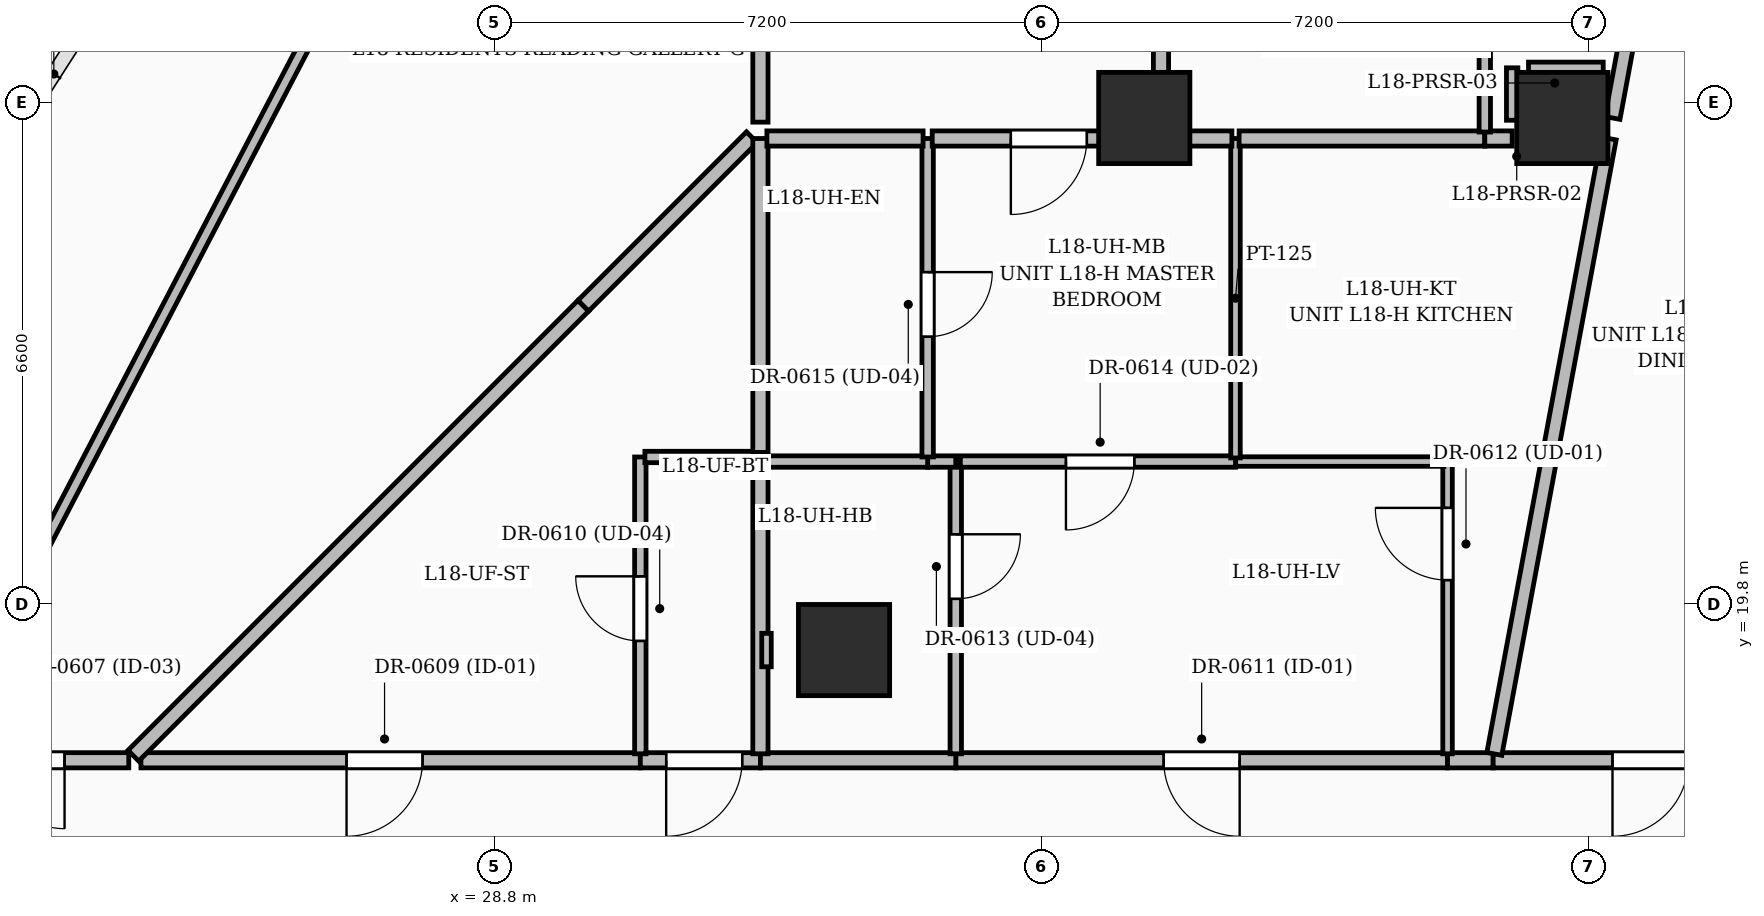
"""IFC4 building model, lengths in metres.
Left out: names, types, materials, properties, quantities, classifications, styles, units other than length and angle.
Written with IfcOpenShell. Run it as: python <this file> out.ifc"""

import sys

from ifc_helpers import new_model, si_unit, direction, frame, frame_2d, origin, origin_2d, place, context, subcontext, project, spatial, rectangle, extrude, element, fill, save


model = new_model("IFC4")
c1 = context("Model", 3, precision=1e-05, world=origin(), true_north=direction((0.0, 1.0)))
c2 = subcontext(c1, "Body", "Model", "MODEL_VIEW")
j1 = project(units=[si_unit("LENGTHUNIT", "METRE"), si_unit("PLANEANGLEUNIT", "RADIAN")], contexts=[c1])
p1 = place(None, origin())
s1 = spatial("IfcSite", under=j1, at=p1, CompositionType="ELEMENT")
p2 = place(p1, origin())
s2 = spatial("IfcBuilding", under=s1, at=p2, CompositionType="ELEMENT")
p3 = place(p2, frame((0.0, 0.0, 75.0)))
s3 = spatial("IfcBuildingStorey", under=s2, at=p3, CompositionType="ELEMENT", Elevation=75.0)
for number, where, z_axis, x_axis in (
    (1, (42.85, 26.2, 0.0), (0.0, 0.0, 1.0), (1.0, 0.0, 0.0)),
    (2, (37.35, 26.2, 0.0), (0.0, 0.0, 1.0), (1.0, 0.0, 0.0)),
    (3, (33.4, 19.2, 0.0), (0.0, 0.0, 1.0), (1.0, 0.0, 0.0)),
):
    element("IfcColumn", number, at=place(p3, frame(where, z_axis=z_axis, x_axis=x_axis)), inside=s3, PredefinedType="COLUMN", context=c2, shape_type="SweptSolid", body=[
        extrude(rectangle(XDim=1.2, YDim=1.2, at=origin_2d()), origin(), (0.0, 0.0, 1.0), 3.6),
    ])
p4 = place(p3, frame((30.72, 17.75, 0.0), z_axis=(0.0, 0.0, 1.0), x_axis=(-1.0, 0.0, 0.0)))
e4 = element("IfcWall", 4, at=p4, inside=s3, PredefinedType="PARTITIONING", context=c2, shape_type="SweptSolid", body=[
    extrude(rectangle(XDim=6.57, YDim=0.2, at=frame_2d((3.285, 0.0))), origin(), (0.0, 0.0, 1.0), 2.345),
])
p5 = place(p4, frame((2.865, 0.0, 0.0)))
e5 = element("IfcOpeningElement", 5, at=p5, cuts=e4, PredefinedType="OPENING", context=c2, shape_type="SweptSolid", body=[
    extrude(rectangle(XDim=1.0, YDim=2.2, at=frame_2d((0.5, 1.1))), frame((0.0, 0.11, 0.0), z_axis=(0.0, -1.0, 0.0), x_axis=(1.0, 0.0, 0.0)), (0.0, 0.0, 1.0), 0.22),
])
p6 = place(p3, frame((32.3, 17.75, 0.0), z_axis=(0.0, 0.0, 1.0), x_axis=(-1.0, 0.0, 0.0)))
e6 = element("IfcWall", 6, at=p6, inside=s3, PredefinedType="PARTITIONING", context=c2, shape_type="SweptSolid", body=[
    extrude(rectangle(XDim=1.58, YDim=0.2, at=frame_2d((0.79, 0.0))), origin(), (0.0, 0.0, 1.0), 3.35),
])
p7 = place(p6, frame((0.24, 0.0, 0.0)))
e7 = element("IfcOpeningElement", 7, at=p7, cuts=e6, PredefinedType="OPENING", context=c2, shape_type="SweptSolid", body=[
    extrude(rectangle(XDim=1.0, YDim=2.2, at=frame_2d((0.5, 1.1))), frame((0.0, 0.11, 0.0), z_axis=(0.0, -1.0, 0.0), x_axis=(1.0, 0.0, 0.0)), (0.0, 0.0, 1.0), 0.22),
])
p8 = place(p3, frame((23.99, 17.75, 0.0), z_axis=(0.0, 0.0, 1.0), x_axis=(-1.0, 0.0, 0.0)))
e8 = element("IfcWall", 8, at=p8, inside=s3, PredefinedType="PARTITIONING", context=c2, shape_type="SweptSolid", body=[
    extrude(rectangle(XDim=2.505, YDim=0.2, at=frame_2d((1.252, 0.0))), origin(), (0.0, 0.0, 1.0), 2.345),
])
p9 = place(p8, frame((0.845, 0.0, 0.0)))
e9 = element("IfcOpeningElement", 9, at=p9, cuts=e8, PredefinedType="OPENING", context=c2, shape_type="SweptSolid", body=[
    extrude(rectangle(XDim=0.9, YDim=2.1, at=frame_2d((0.45, 1.05))), frame((0.0, 0.11, 0.0), z_axis=(0.0, -1.0, 0.0), x_axis=(1.0, 0.0, 0.0)), (0.0, 0.0, 1.0), 0.22),
])
p10 = place(p3, frame((41.34, 17.75, 0.0), z_axis=(0.0, 0.0, 1.0), x_axis=(-1.0, 0.0, 0.0)))
e10 = element("IfcWall", 10, at=p10, inside=s3, PredefinedType="PARTITIONING", context=c2, shape_type="SweptSolid", body=[
    extrude(rectangle(XDim=6.47, YDim=0.2, at=frame_2d((3.235, 0.0))), origin(), (0.0, 0.0, 1.0), 3.35),
])
p11 = place(p10, frame((2.735, 0.0, 0.0)))
e11 = element("IfcOpeningElement", 11, at=p11, cuts=e10, PredefinedType="OPENING", context=c2, shape_type="SweptSolid", body=[
    extrude(rectangle(XDim=1.0, YDim=2.2, at=frame_2d((0.5, 1.1))), frame((0.0, 0.11, 0.0), z_axis=(0.0, -1.0, 0.0), x_axis=(1.0, 0.0, 0.0)), (0.0, 0.0, 1.0), 0.22),
])
p12 = place(p3, frame((34.87, 17.75, 0.0), z_axis=(0.0, 0.0, 1.0), x_axis=(-1.0, 0.0, 0.0)))
e12 = element("IfcWall", 12, at=p12, inside=s3, PredefinedType="PARTITIONING", context=c2, shape_type="SweptSolid", body=[
    extrude(rectangle(XDim=2.57, YDim=0.2, at=frame_2d((1.285, 0.0))), origin(), (0.0, 0.0, 1.0), 2.309),
])
p13 = place(p3, frame((41.94, 17.75, 0.0), z_axis=(0.0, 0.0, 1.0), x_axis=(-1.0, 0.0, 0.0)))
e13 = element("IfcWall", 13, at=p13, inside=s3, PredefinedType="PARTITIONING", context=c2, shape_type="SweptSolid", body=[
    extrude(rectangle(XDim=0.6, YDim=0.2, at=frame_2d((0.3, 0.0))), origin(), (0.0, 0.0, 1.0), 3.35),
])
p14 = place(p3, frame((47.51, 17.75, 0.0), z_axis=(0.0, 0.0, 1.0), x_axis=(-1.0, 0.0, 0.0)))
e14 = element("IfcWall", 14, at=p14, inside=s3, PredefinedType="PARTITIONING", context=c2, shape_type="SweptSolid", body=[
    extrude(rectangle(XDim=5.57, YDim=0.2, at=frame_2d((2.785, 0.0))), origin(), (0.0, 0.0, 1.0), 2.309),
])
p15 = place(p14, frame((3.0, 0.0, 0.0)))
e15 = element("IfcOpeningElement", 15, at=p15, cuts=e14, PredefinedType="OPENING", context=c2, shape_type="SweptSolid", body=[
    extrude(rectangle(XDim=1.0, YDim=2.2, at=frame_2d((0.5, 1.1))), frame((0.0, 0.11, 0.0), z_axis=(0.0, -1.0, 0.0), x_axis=(1.0, 0.0, 0.0)), (0.0, 0.0, 1.0), 0.22),
])
p16 = place(p3, frame((21.4, 17.75, 0.0), z_axis=(0.0, 0.0, 1.0), x_axis=(0.46207959711, 0.886838455376, 0.0)))
e16 = element("IfcWall", 16, at=p16, inside=s3, PredefinedType="PARTITIONING", context=c2, shape_type="SweptSolid", body=[
    extrude(rectangle(XDim=23.589, YDim=0.15, at=frame_2d((11.795, 0.0))), origin(), (0.0, 0.0, 1.0), 2.345),
])
p17 = place(p3, frame((30.72, 17.835, 0.0), z_axis=(0.0, 0.0, 1.0), x_axis=(0.0, 1.0, 0.0)))
e17 = element("IfcWall", 17, at=p17, inside=s3, PredefinedType="PARTITIONING", context=c2, shape_type="SweptSolid", body=[
    extrude(rectangle(XDim=3.905, YDim=0.15, at=frame_2d((1.953, 0.0))), origin(), (0.0, 0.0, 1.0), 2.345),
])
p18 = place(p17, frame((1.485, 0.0, 0.0)))
e18 = element("IfcOpeningElement", 18, at=p18, cuts=e17, PredefinedType="OPENING", context=c2, shape_type="SweptSolid", body=[
    extrude(rectangle(XDim=0.85, YDim=2.1, at=frame_2d((0.425, 1.05))), frame((0.0, 0.085, 0.0), z_axis=(0.0, -1.0, 0.0), x_axis=(1.0, 0.0, 0.0)), (0.0, 0.0, 1.0), 0.17),
])
p19 = place(p3, frame((29.97, 23.73, 0.0), z_axis=(0.0, 0.0, 1.0), x_axis=(-0.707106781187, -0.707106781187, 0.0)))
e19 = element("IfcWall", 19, at=p19, inside=s3, PredefinedType="PARTITIONING", context=c2, shape_type="SweptSolid", body=[
    extrude(rectangle(XDim=8.372, YDim=0.2, at=frame_2d((4.186, 0.0))), origin(), (0.0, 0.0, 1.0), 2.345),
])
p20 = place(p3, frame((30.78, 21.74, 0.0), z_axis=(0.0, 0.0, 1.0), x_axis=(1.0, 0.0, 0.0)))
e20 = element("IfcWall", 20, at=p20, inside=s3, PredefinedType="PARTITIONING", context=c2, shape_type="SweptSolid", body=[
    extrude(rectangle(XDim=1.52, YDim=0.15, at=frame_2d((0.76, 0.0))), origin(), (0.0, 0.0, 1.0), 2.345),
])
p21 = place(p3, frame((32.187, 25.947, 0.0), z_axis=(0.0, 0.0, 1.0), x_axis=(-0.707106781187, -0.707106781187, 0.0)))
e21 = element("IfcWall", 21, at=p21, inside=s3, PredefinedType="PARTITIONING", context=c2, shape_type="SweptSolid", body=[
    extrude(rectangle(XDim=3.135, YDim=0.2, at=frame_2d((1.568, 0.0))), origin(), (0.0, 0.0, 1.0), 3.35),
])
p22 = place(p3, frame((32.3, 21.8, 0.0), z_axis=(0.0, 0.0, 1.0), x_axis=(0.0, 1.0, 0.0)))
e22 = element("IfcWall", 22, at=p22, inside=s3, PredefinedType="PARTITIONING", context=c2, shape_type="SweptSolid", body=[
    extrude(rectangle(XDim=4.13, YDim=0.2, at=frame_2d((2.065, 0.0))), origin(), (0.0, 0.0, 1.0), 2.911),
])
p23 = place(p3, frame((32.3, 17.835, 0.0), z_axis=(0.0, 0.0, 1.0), x_axis=(0.0, 1.0, 0.0)))
e23 = element("IfcWall", 23, at=p23, inside=s3, PredefinedType="PARTITIONING", context=c2, shape_type="SweptSolid", body=[
    extrude(rectangle(XDim=3.845, YDim=0.2, at=frame_2d((1.922, 0.0))), origin(), (0.0, 0.0, 1.0), 2.345),
])
p24 = place(p3, frame((32.3, 26.145, 0.0), z_axis=(0.0, 0.0, 1.0), x_axis=(0.0, 1.0, 0.0)))
e24 = element("IfcWall", 24, at=p24, inside=s3, PredefinedType="PARTITIONING", context=c2, shape_type="SweptSolid", body=[
    extrude(rectangle(XDim=10.775, YDim=0.2, at=frame_2d((5.387, 0.0))), origin(), (0.0, 0.0, 1.0), 2.345),
])
p25 = place(p3, frame((34.87, 21.68, 0.0), z_axis=(0.0, 0.0, 1.0), x_axis=(0.0, -1.0, 0.0)))
e25 = element("IfcWall", 25, at=p25, inside=s3, PredefinedType="PARTITIONING", context=c2, shape_type="SweptSolid", body=[
    extrude(rectangle(XDim=3.845, YDim=0.15, at=frame_2d((1.922, 0.0))), origin(), (0.0, 0.0, 1.0), 2.309),
])
p26 = place(p25, frame((0.957, 0.0, 0.0)))
e26 = element("IfcOpeningElement", 26, at=p26, cuts=e25, PredefinedType="OPENING", context=c2, shape_type="SweptSolid", body=[
    extrude(rectangle(XDim=0.85, YDim=2.1, at=frame_2d((0.425, 1.05))), frame((0.0, 0.085, 0.0), z_axis=(0.0, -1.0, 0.0), x_axis=(1.0, 0.0, 0.0)), (0.0, 0.0, 1.0), 0.17),
])
p27 = place(p3, frame((41.34, 17.835, 0.0), z_axis=(0.0, 0.0, 1.0), x_axis=(0.0, 1.0, 0.0)))
e27 = element("IfcWall", 27, at=p27, inside=s3, PredefinedType="PARTITIONING", context=c2, shape_type="SweptSolid", body=[
    extrude(rectangle(XDim=3.845, YDim=0.125, at=frame_2d((1.922, 0.0))), origin(), (0.0, 0.0, 1.0), 3.35),
])
p28 = place(p27, frame((2.285, 0.0, 0.0)))
e28 = element("IfcOpeningElement", 28, at=p28, cuts=e27, PredefinedType="OPENING", context=c2, shape_type="SweptSolid", body=[
    extrude(rectangle(XDim=0.95, YDim=2.2, at=frame_2d((0.475, 1.1))), frame((0.0, 0.072, 0.0), z_axis=(0.0, -1.0, 0.0), x_axis=(1.0, 0.0, 0.0)), (0.0, 0.0, 1.0), 0.145),
])
p29 = place(p3, frame((41.292, 21.68, 0.0), z_axis=(0.0, 0.0, 1.0), x_axis=(-1.0, 0.0, 0.0)))
e29 = element("IfcWall", 29, at=p29, inside=s3, PredefinedType="PARTITIONING", context=c2, shape_type="SweptSolid", body=[
    extrude(rectangle(XDim=2.742, YDim=0.125, at=frame_2d((1.371, 0.0))), origin(), (0.0, 0.0, 1.0), 3.35),
])
p30 = place(p3, frame((38.55, 21.68, 0.0), z_axis=(0.0, 0.0, 1.0), x_axis=(-1.0, 0.0, 0.0)))
e30 = element("IfcWall", 30, at=p30, inside=s3, PredefinedType="PARTITIONING", context=c2, shape_type="SweptSolid", body=[
    extrude(rectangle(XDim=3.62, YDim=0.15, at=frame_2d((1.81, 0.0))), origin(), (0.0, 0.0, 1.0), 2.309),
])
p31 = place(p30, frame((1.331, 0.0, 0.0)))
e31 = element("IfcOpeningElement", 31, at=p31, cuts=e30, PredefinedType="OPENING", context=c2, shape_type="SweptSolid", body=[
    extrude(rectangle(XDim=0.9, YDim=2.15, at=frame_2d((0.45, 1.075))), frame((0.0, 0.085, 0.0), z_axis=(0.0, -1.0, 0.0), x_axis=(1.0, 0.0, 0.0)), (0.0, 0.0, 1.0), 0.17),
])
p32 = place(p3, frame((34.87, 21.68, 0.0), z_axis=(0.0, 0.0, 1.0), x_axis=(-1.0, 0.0, 0.0)))
e32 = element("IfcWall", 32, at=p32, inside=s3, PredefinedType="PARTITIONING", context=c2, shape_type="SweptSolid", body=[
    extrude(rectangle(XDim=0.37, YDim=0.15, at=frame_2d((0.185, 0.0))), origin(), (0.0, 0.0, 1.0), 2.309),
])
p33 = place(p3, frame((34.5, 21.68, 0.0), z_axis=(0.0, 0.0, 1.0), x_axis=(-1.0, 0.0, 0.0)))
e33 = element("IfcWall", 33, at=p33, inside=s3, PredefinedType="PARTITIONING", context=c2, shape_type="SweptSolid", body=[
    extrude(rectangle(XDim=2.115, YDim=0.15, at=frame_2d((1.058, 0.0))), origin(), (0.0, 0.0, 1.0), 3.35),
])
p34 = place(p3, frame((38.55, 25.93, 0.0), z_axis=(0.0, 0.0, 1.0), x_axis=(0.0, -1.0, 0.0)))
e34 = element("IfcWall", 34, at=p34, inside=s3, PredefinedType="PARTITIONING", context=c2, shape_type="SweptSolid", body=[
    extrude(rectangle(XDim=4.202, YDim=0.125, at=frame_2d((2.101, 0.0))), origin(), (0.0, 0.0, 1.0), 3.35),
])
p35 = place(p3, frame((41.956, 17.833, 0.0), z_axis=(0.0, 0.0, 1.0), x_axis=(0.182682671213, 0.98317192883, 0.0)))
e35 = element("IfcWall", 35, at=p35, inside=s3, PredefinedType="PARTITIONING", context=c2, shape_type="SweptSolid", body=[
    extrude(rectangle(XDim=8.235, YDim=0.2, at=frame_2d((4.118, 0.0))), origin(), (0.0, 0.0, 1.0), 2.309),
])
p36 = place(p3, frame((41.83, 25.93, 0.0), z_axis=(0.0, 0.0, 1.0), x_axis=(-1.0, 0.0, 0.0)))
e36 = element("IfcWall", 36, at=p36, inside=s3, PredefinedType="PARTITIONING", context=c2, shape_type="SweptSolid", body=[
    extrude(rectangle(XDim=3.233, YDim=0.2, at=frame_2d((1.616, 0.0))), origin(), (0.0, 0.0, 1.0), 2.309),
])
p37 = place(p3, frame((42.19, 25.93, 0.0), z_axis=(0.0, 0.0, 1.0), x_axis=(-1.0, 0.0, 0.0)))
e37 = element("IfcWall", 37, at=p37, inside=s3, PredefinedType="PARTITIONING", context=c2, shape_type="SweptSolid", body=[
    extrude(rectangle(XDim=0.36, YDim=0.2, at=frame_2d((0.18, 0.0))), origin(), (0.0, 0.0, 1.0), 2.309),
])
p38 = place(p3, frame((34.5, 25.93, 0.0), z_axis=(0.0, 0.0, 1.0), x_axis=(0.0, -1.0, 0.0)))
e38 = element("IfcWall", 38, at=p38, inside=s3, PredefinedType="PARTITIONING", context=c2, shape_type="SweptSolid", body=[
    extrude(rectangle(XDim=4.19, YDim=0.15, at=frame_2d((2.095, 0.0))), origin(), (0.0, 0.0, 1.0), 3.35),
])
p39 = place(p38, frame((1.758, 0.0, 0.0)))
e39 = element("IfcOpeningElement", 39, at=p39, cuts=e38, PredefinedType="OPENING", context=c2, shape_type="SweptSolid", body=[
    extrude(rectangle(XDim=0.85, YDim=2.1, at=frame_2d((0.425, 1.05))), frame((0.0, 0.085, 0.0), z_axis=(0.0, -1.0, 0.0), x_axis=(1.0, 0.0, 0.0)), (0.0, 0.0, 1.0), 0.17),
])
p40 = place(p3, frame((37.57, 25.93, 0.0), z_axis=(0.0, 0.0, 1.0), x_axis=(-1.0, 0.0, 0.0)))
e40 = element("IfcWall", 40, at=p40, inside=s3, PredefinedType="PARTITIONING", context=c2, shape_type="SweptSolid", body=[
    extrude(rectangle(XDim=3.01, YDim=0.2, at=frame_2d((1.505, 0.0))), origin(), (0.0, 0.0, 1.0), 3.35),
])
p41 = place(p40, frame((0.975, 0.0, 0.0)))
e41 = element("IfcOpeningElement", 41, at=p41, cuts=e40, PredefinedType="OPENING", context=c2, shape_type="SweptSolid", body=[
    extrude(rectangle(XDim=1.0, YDim=2.2, at=frame_2d((0.5, 1.1))), frame((0.0, 0.11, 0.0), z_axis=(0.0, -1.0, 0.0), x_axis=(1.0, 0.0, 0.0)), (0.0, 0.0, 1.0), 0.22),
])
p42 = place(p3, frame((38.502, 25.93, 0.0), z_axis=(0.0, 0.0, 1.0), x_axis=(-1.0, 0.0, 0.0)))
e42 = element("IfcWall", 42, at=p42, inside=s3, PredefinedType="PARTITIONING", context=c2, shape_type="SweptSolid", body=[
    extrude(rectangle(XDim=0.932, YDim=0.2, at=frame_2d((0.466, 0.0))), origin(), (0.0, 0.0, 1.0), 2.309),
])
p43 = place(p3, frame((34.44, 25.93, 0.0), z_axis=(0.0, 0.0, 1.0), x_axis=(-1.0, 0.0, 0.0)))
e43 = element("IfcWall", 43, at=p43, inside=s3, PredefinedType="PARTITIONING", context=c2, shape_type="SweptSolid", body=[
    extrude(rectangle(XDim=2.055, YDim=0.2, at=frame_2d((1.027, 0.0))), origin(), (0.0, 0.0, 1.0), 2.911),
])
p44 = place(p3, frame((44.0, 28.84, 0.0), z_axis=(0.0, 0.0, 1.0), x_axis=(-0.18247668152, -0.983210181345, 0.0)))
e44 = element("IfcWall", 44, at=p44, inside=s3, PredefinedType="PARTITIONING", context=c2, shape_type="SweptSolid", body=[
    extrude(rectangle(XDim=2.685, YDim=0.2, at=frame_2d((1.343, 0.0))), origin(), (0.0, 0.0, 1.0), 2.911),
])
p45 = place(p3, frame((37.57, 26.015, 0.0), z_axis=(0.0, 0.0, 1.0), x_axis=(0.0, 1.0, 0.0)))
e45 = element("IfcWall", 45, at=p45, inside=s3, PredefinedType="PARTITIONING", context=c2, shape_type="SweptSolid", body=[
    extrude(rectangle(XDim=3.855, YDim=0.2, at=frame_2d((1.928, 0.0))), origin(), (0.0, 0.0, 1.0), 2.911),
])
p46 = place(p3, frame((41.83, 26.015, 0.0), z_axis=(0.0, 0.0, 1.0), x_axis=(0.0, 1.0, 0.0)))
e46 = element("IfcWall", 46, at=p46, inside=s3, PredefinedType="PARTITIONING", context=c2, shape_type="SweptSolid", body=[
    extrude(rectangle(XDim=2.825, YDim=0.15, at=frame_2d((1.413, 0.0))), origin(), (0.0, 0.0, 1.0), 2.309),
])
p47 = place(p3, frame((42.19, 26.17, 0.0), z_axis=(0.0, 0.0, 1.0), x_axis=(0.0, 1.0, 0.0)))
e47 = element("IfcWall", 47, at=p47, inside=s3, PredefinedType="PARTITIONING", context=c2, shape_type="SweptSolid", body=[
    extrude(rectangle(XDim=0.69, YDim=0.15, at=frame_2d((0.345, 0.0))), origin(), (0.0, 0.0, 1.0), 2.309),
])
p48 = place(p3, frame((42.405, 26.86, 0.0), z_axis=(0.0, 0.0, 1.0), x_axis=(1.0, 0.0, 0.0)))
e48 = element("IfcWall", 48, at=p48, inside=s3, PredefinedType="PARTITIONING", context=c2, shape_type="SweptSolid", body=[
    extrude(rectangle(XDim=0.983, YDim=0.15, at=frame_2d((0.491, 0.0))), origin(), (0.0, 0.0, 1.0), 2.345),
])
p49 = place(p3, frame((32.38, 18.98, 0.0), z_axis=(0.0, 0.0, 1.0), x_axis=(0.0, 1.0, 0.0)))
e49 = element("IfcWall", 49, at=p49, inside=s3, PredefinedType="PARTITIONING", context=c2, shape_type="SweptSolid", body=[
    extrude(rectangle(XDim=0.44, YDim=0.125, at=frame_2d((0.22, 0.0))), origin(), (0.0, 0.0, 1.0), 3.35),
])
p50 = place(p9, origin())
e50 = element("IfcDoor", 50, at=p50, inside=s3, OperationType="SINGLE_SWING_LEFT", PredefinedType="DOOR", context=c2, shape_type="SweptSolid", body=[
    extrude(rectangle(XDim=0.9, YDim=2.1, at=frame_2d((0.45, 1.05))), frame((0.0, 0.025, 0.0), z_axis=(0.0, -1.0, 0.0), x_axis=(1.0, 0.0, 0.0)), (0.0, 0.0, 1.0), 0.05),
])
fill(e9, e50)
p51 = place(p5, origin())
e51 = element("IfcDoor", 51, at=p51, inside=s3, OperationType="SINGLE_SWING_RIGHT", PredefinedType="DOOR", context=c2, shape_type="SweptSolid", body=[
    extrude(rectangle(XDim=1.0, YDim=2.2, at=frame_2d((0.5, 1.1))), frame((0.0, 0.025, 0.0), z_axis=(0.0, -1.0, 0.0), x_axis=(1.0, 0.0, 0.0)), (0.0, 0.0, 1.0), 0.05),
])
fill(e5, e51)
p52 = place(p18, origin())
e52 = element("IfcDoor", 52, at=p52, inside=s3, OperationType="SINGLE_SWING_RIGHT", PredefinedType="DOOR", context=c2, shape_type="SweptSolid", body=[
    extrude(rectangle(XDim=0.85, YDim=2.1, at=frame_2d((0.425, 1.05))), frame((0.0, 0.025, 0.0), z_axis=(0.0, -1.0, 0.0), x_axis=(1.0, 0.0, 0.0)), (0.0, 0.0, 1.0), 0.05),
])
fill(e18, e52)
p53 = place(p11, origin())
e53 = element("IfcDoor", 53, at=p53, inside=s3, OperationType="SINGLE_SWING_LEFT", PredefinedType="DOOR", context=c2, shape_type="SweptSolid", body=[
    extrude(rectangle(XDim=1.0, YDim=2.2, at=frame_2d((0.5, 1.1))), frame((0.0, 0.025, 0.0), z_axis=(0.0, -1.0, 0.0), x_axis=(1.0, 0.0, 0.0)), (0.0, 0.0, 1.0), 0.05),
])
fill(e11, e53)
p54 = place(p28, origin())
e54 = element("IfcDoor", 54, at=p54, inside=s3, OperationType="SINGLE_SWING_RIGHT", PredefinedType="DOOR", context=c2, shape_type="SweptSolid", body=[
    extrude(rectangle(XDim=0.95, YDim=2.2, at=frame_2d((0.475, 1.1))), frame((0.0, 0.025, 0.0), z_axis=(0.0, -1.0, 0.0), x_axis=(1.0, 0.0, 0.0)), (0.0, 0.0, 1.0), 0.05),
])
fill(e28, e54)
p55 = place(p26, origin())
e55 = element("IfcDoor", 55, at=p55, inside=s3, OperationType="SINGLE_SWING_LEFT", PredefinedType="DOOR", context=c2, shape_type="SweptSolid", body=[
    extrude(rectangle(XDim=0.85, YDim=2.1, at=frame_2d((0.425, 1.05))), frame((0.0, 0.025, 0.0), z_axis=(0.0, -1.0, 0.0), x_axis=(1.0, 0.0, 0.0)), (0.0, 0.0, 1.0), 0.05),
])
fill(e26, e55)
p56 = place(p31, origin())
e56 = element("IfcDoor", 56, at=p56, inside=s3, OperationType="SINGLE_SWING_RIGHT", PredefinedType="DOOR", context=c2, shape_type="SweptSolid", body=[
    extrude(rectangle(XDim=0.9, YDim=2.15, at=frame_2d((0.45, 1.075))), frame((0.0, 0.025, 0.0), z_axis=(0.0, -1.0, 0.0), x_axis=(1.0, 0.0, 0.0)), (0.0, 0.0, 1.0), 0.05),
])
fill(e31, e56)
p57 = place(p39, origin())
e57 = element("IfcDoor", 57, at=p57, inside=s3, OperationType="SINGLE_SWING_LEFT", PredefinedType="DOOR", context=c2, shape_type="SweptSolid", body=[
    extrude(rectangle(XDim=0.85, YDim=2.1, at=frame_2d((0.425, 1.05))), frame((0.0, 0.025, 0.0), z_axis=(0.0, -1.0, 0.0), x_axis=(1.0, 0.0, 0.0)), (0.0, 0.0, 1.0), 0.05),
])
fill(e39, e57)
p58 = place(p15, origin())
e58 = element("IfcDoor", 58, at=p58, inside=s3, OperationType="SINGLE_SWING_RIGHT", PredefinedType="DOOR", context=c2, shape_type="SweptSolid", body=[
    extrude(rectangle(XDim=1.0, YDim=2.2, at=frame_2d((0.5, 1.1))), frame((0.0, 0.025, 0.0), z_axis=(0.0, -1.0, 0.0), x_axis=(1.0, 0.0, 0.0)), (0.0, 0.0, 1.0), 0.05),
])
fill(e15, e58)
p59 = place(p41, origin())
e59 = element("IfcDoor", 59, at=p59, inside=s3, OperationType="SINGLE_SWING_RIGHT", PredefinedType="DOOR", context=c2, shape_type="SweptSolid", body=[
    extrude(rectangle(XDim=1.0, YDim=2.2, at=frame_2d((0.5, 1.1))), frame((0.0, 0.025, 0.0), z_axis=(0.0, -1.0, 0.0), x_axis=(1.0, 0.0, 0.0)), (0.0, 0.0, 1.0), 0.05),
])
fill(e41, e59)
p60 = place(p7, origin())
e60 = element("IfcDoor", 60, at=p60, inside=s3, OperationType="SINGLE_SWING_RIGHT", PredefinedType="DOOR", context=c2, shape_type="SweptSolid", body=[
    extrude(rectangle(XDim=1.0, YDim=2.2, at=frame_2d((0.5, 1.1))), frame((0.0, 0.025, 0.0), z_axis=(0.0, -1.0, 0.0), x_axis=(1.0, 0.0, 0.0)), (0.0, 0.0, 1.0), 0.05),
])
fill(e7, e60)
save(model, sys.argv[1])
